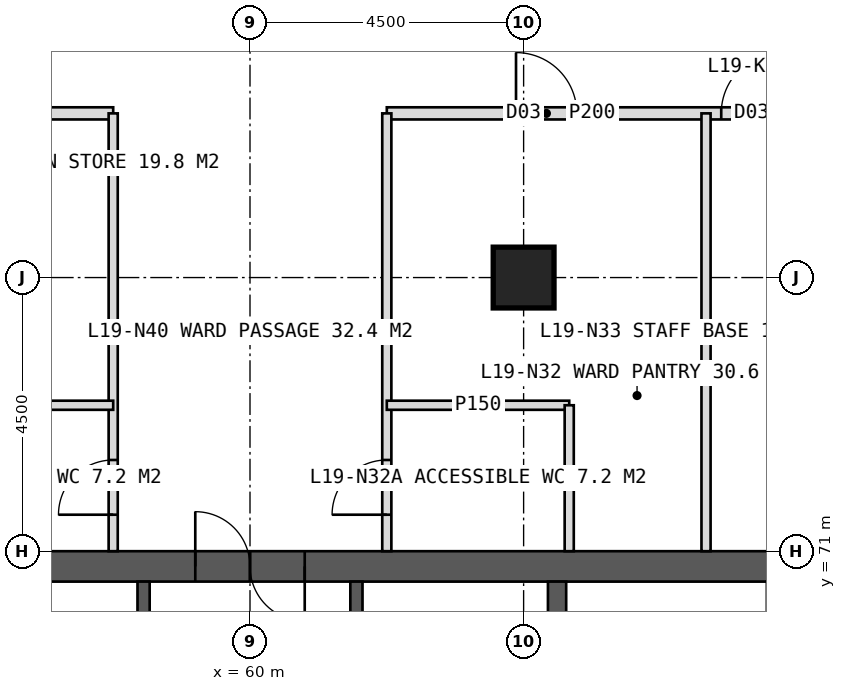
"""IFC4 building model, lengths in metres.
Left out: names, types, materials, properties, quantities, classifications, styles, units other than length and angle.
Written with IfcOpenShell. Run it as: python <this file> out.ifc"""

import sys

from ifc_helpers import new_model, si_unit, direction, frame, frame_2d, origin, origin_2d, place, context, subcontext, project, spatial, rectangle, hollow_rectangle, extrude, element, fill, save


model = new_model("IFC4")
c1 = context("Model", 3, precision=1e-05, world=origin(), true_north=direction((0.0, 1.0)))
c2 = subcontext(c1, "Body", "Model", "MODEL_VIEW")
j1 = project(units=[si_unit("LENGTHUNIT", "METRE"), si_unit("PLANEANGLEUNIT", "RADIAN")], contexts=[c1])
p1 = place(None, origin())
s1 = spatial("IfcSite", under=j1, at=p1, CompositionType="ELEMENT")
p2 = place(p1, origin())
s2 = spatial("IfcBuilding", under=s1, at=p2, CompositionType="ELEMENT")
p3 = place(p2, frame((0.0, 0.0, 83.0)))
s3 = spatial("IfcBuildingStorey", under=s2, at=p3, CompositionType="ELEMENT", Elevation=83.0)
p4 = place(p3, frame((51.0, 70.75, 0.0), z_axis=(0.0, 0.0, 1.0), x_axis=(1.0, 0.0, 0.0)))
e1 = element("IfcWall", 1, at=p4, inside=s3, PredefinedType="SHEAR", context=c2, shape_type="SweptSolid", body=[
    extrude(rectangle(XDim=18.0, YDim=0.5, at=frame_2d((9.0, 0.0))), origin(), (0.0, 0.0, 1.0), 4.0),
])
p5 = place(p4, frame((8.1, 0.0, 0.0)))
e2 = element("IfcOpeningElement", 2, at=p5, cuts=e1, PredefinedType="OPENING", context=c2, shape_type="SweptSolid", body=[
    extrude(rectangle(XDim=1.8, YDim=2.2, at=frame_2d((0.9, 1.1))), frame((0.0, 0.26, 0.0), z_axis=(0.0, -1.0, 0.0), x_axis=(1.0, 0.0, 0.0)), (0.0, 0.0, 1.0), 0.52),
])
p6 = place(p3, frame((65.05, 53.5, 0.0), z_axis=(0.0, 0.0, 1.0), x_axis=(0.0, 1.0, 0.0)))
e3 = element("IfcWall", 3, at=p6, inside=s3, PredefinedType="SHEAR", context=c2, shape_type="SweptSolid", body=[
    extrude(rectangle(XDim=17.0, YDim=0.3, at=frame_2d((8.5, 0.0))), origin(), (0.0, 0.0, 1.0), 4.0),
])
p7 = place(p3, frame((58.25, 53.5, 0.0), z_axis=(0.0, 0.0, 1.0), x_axis=(0.0, 1.0, 0.0)))
e4 = element("IfcWall", 4, at=p7, inside=s3, PredefinedType="SHEAR", context=c2, shape_type="SweptSolid", body=[
    extrude(rectangle(XDim=17.0, YDim=0.2, at=frame_2d((8.5, 0.0))), origin(), (0.0, 0.0, 1.0), 4.0),
])
p8 = place(p7, frame((1.375, 0.0, 0.0)))
e5 = element("IfcOpeningElement", 5, at=p8, cuts=e4, PredefinedType="OPENING", context=c2, shape_type="SweptSolid", body=[
    extrude(rectangle(XDim=1.4, YDim=2.2, at=frame_2d((0.7, 1.1))), frame((0.0, 0.11, 0.0), z_axis=(0.0, -1.0, 0.0), x_axis=(1.0, 0.0, 0.0)), (0.0, 0.0, 1.0), 0.22),
])
p9 = place(p7, frame((5.675, 0.0, 0.0)))
e6 = element("IfcOpeningElement", 6, at=p9, cuts=e4, PredefinedType="OPENING", context=c2, shape_type="SweptSolid", body=[
    extrude(rectangle(XDim=1.4, YDim=2.2, at=frame_2d((0.7, 1.1))), frame((0.0, 0.11, 0.0), z_axis=(0.0, -1.0, 0.0), x_axis=(1.0, 0.0, 0.0)), (0.0, 0.0, 1.0), 0.22),
])
p10 = place(p3, frame((61.75, 53.5, 0.0), z_axis=(0.0, 0.0, 1.0), x_axis=(0.0, 1.0, 0.0)))
e7 = element("IfcWall", 7, at=p10, inside=s3, PredefinedType="SHEAR", context=c2, shape_type="SweptSolid", body=[
    extrude(rectangle(XDim=17.0, YDim=0.2, at=frame_2d((8.5, 0.0))), origin(), (0.0, 0.0, 1.0), 4.0),
])
p11 = place(p10, frame((1.375, 0.0, 0.0)))
e8 = element("IfcOpeningElement", 8, at=p11, cuts=e7, PredefinedType="OPENING", context=c2, shape_type="SweptSolid", body=[
    extrude(rectangle(XDim=1.4, YDim=2.2, at=frame_2d((0.7, 1.1))), frame((0.0, 0.11, 0.0), z_axis=(0.0, -1.0, 0.0), x_axis=(1.0, 0.0, 0.0)), (0.0, 0.0, 1.0), 0.22),
])
p12 = place(p10, frame((5.675, 0.0, 0.0)))
e9 = element("IfcOpeningElement", 9, at=p12, cuts=e7, PredefinedType="OPENING", context=c2, shape_type="SweptSolid", body=[
    extrude(rectangle(XDim=1.4, YDim=2.2, at=frame_2d((0.7, 1.1))), frame((0.0, 0.11, 0.0), z_axis=(0.0, -1.0, 0.0), x_axis=(1.0, 0.0, 0.0)), (0.0, 0.0, 1.0), 0.22),
])
p13 = place(p3, frame((64.5, 75.5, 0.0), z_axis=(0.0, 0.0, 1.0), x_axis=(1.0, 0.0, 0.0)))
e10 = element("IfcColumn", 10, at=p13, inside=s3, PredefinedType="COLUMN", context=c2, shape_type="SweptSolid", body=[
    extrude(hollow_rectangle(XDim=1.0, YDim=1.0, WallThickness=0.1, at=origin_2d()), origin(), (0.0, 0.0, 1.0), 4.0),
])
p14 = place(p3, frame((43.8, 78.2, 0.0), z_axis=(0.0, 0.0, 1.0), x_axis=(1.0, 0.0, 0.0)))
e11 = element("IfcWall", 11, at=p14, inside=s3, PredefinedType="PARTITIONING", context=c2, shape_type="SweptSolid", body=[
    extrude(rectangle(XDim=13.95, YDim=0.2, at=frame_2d((6.975, 0.0))), origin(), (0.0, 0.0, 1.0), 3.75),
])
p15 = place(p14, frame((8.2, 0.0, 0.0)))
e12 = element("IfcOpeningElement", 12, at=p15, cuts=e11, PredefinedType="OPENING", context=c2, shape_type="SweptSolid", body=[
    extrude(rectangle(XDim=1.0, YDim=2.1, at=frame_2d((0.5, 1.05))), frame((0.0, 0.11, 0.0), z_axis=(0.0, -1.0, 0.0), x_axis=(1.0, 0.0, 0.0)), (0.0, 0.0, 1.0), 0.22),
])
p16 = place(p14, frame((11.575, 0.0, 0.0)))
e13 = element("IfcOpeningElement", 13, at=p16, cuts=e11, PredefinedType="OPENING", context=c2, shape_type="SweptSolid", body=[
    extrude(rectangle(XDim=1.0, YDim=2.1, at=frame_2d((0.5, 1.05))), frame((0.0, 0.11, 0.0), z_axis=(0.0, -1.0, 0.0), x_axis=(1.0, 0.0, 0.0)), (0.0, 0.0, 1.0), 0.22),
])
p17 = place(p3, frame((62.25, 78.2, 0.0), z_axis=(0.0, 0.0, 1.0), x_axis=(1.0, 0.0, 0.0)))
e14 = element("IfcWall", 14, at=p17, inside=s3, PredefinedType="PARTITIONING", context=c2, shape_type="SweptSolid", body=[
    extrude(rectangle(XDim=6.75, YDim=0.2, at=frame_2d((3.375, 0.0))), origin(), (0.0, 0.0, 1.0), 3.75),
])
p18 = place(p17, frame((2.125, 0.0, 0.0)))
e15 = element("IfcOpeningElement", 15, at=p18, cuts=e14, PredefinedType="OPENING", context=c2, shape_type="SweptSolid", body=[
    extrude(rectangle(XDim=1.0, YDim=2.1, at=frame_2d((0.5, 1.05))), frame((0.0, 0.11, 0.0), z_axis=(0.0, -1.0, 0.0), x_axis=(1.0, 0.0, 0.0)), (0.0, 0.0, 1.0), 0.22),
])
p19 = place(p17, frame((5.5, 0.0, 0.0)))
e16 = element("IfcOpeningElement", 16, at=p19, cuts=e14, PredefinedType="OPENING", context=c2, shape_type="SweptSolid", body=[
    extrude(rectangle(XDim=1.0, YDim=2.1, at=frame_2d((0.5, 1.05))), frame((0.0, 0.11, 0.0), z_axis=(0.0, -1.0, 0.0), x_axis=(1.0, 0.0, 0.0)), (0.0, 0.0, 1.0), 0.22),
])
p20 = place(p3, frame((57.75, 71.0, 0.0), z_axis=(0.0, 0.0, 1.0), x_axis=(0.0, 1.0, 0.0)))
e17 = element("IfcWall", 17, at=p20, inside=s3, PredefinedType="PARTITIONING", context=c2, shape_type="SweptSolid", body=[
    extrude(rectangle(XDim=7.2, YDim=0.15, at=frame_2d((3.6, 0.0))), origin(), (0.0, 0.0, 1.0), 3.75),
])
p21 = place(p20, frame((0.6, 0.0, 0.0)))
e18 = element("IfcOpeningElement", 18, at=p21, cuts=e17, PredefinedType="OPENING", context=c2, shape_type="SweptSolid", body=[
    extrude(rectangle(XDim=0.9, YDim=2.1, at=frame_2d((0.45, 1.05))), frame((0.0, 0.085, 0.0), z_axis=(0.0, -1.0, 0.0), x_axis=(1.0, 0.0, 0.0)), (0.0, 0.0, 1.0), 0.17),
])
p22 = place(p3, frame((62.25, 71.0, 0.0), z_axis=(0.0, 0.0, 1.0), x_axis=(0.0, 1.0, 0.0)))
e19 = element("IfcWall", 19, at=p22, inside=s3, PredefinedType="PARTITIONING", context=c2, shape_type="SweptSolid", body=[
    extrude(rectangle(XDim=7.2, YDim=0.15, at=frame_2d((3.6, 0.0))), origin(), (0.0, 0.0, 1.0), 3.75),
])
p23 = place(p22, frame((0.6, 0.0, 0.0)))
e20 = element("IfcOpeningElement", 20, at=p23, cuts=e19, PredefinedType="OPENING", context=c2, shape_type="SweptSolid", body=[
    extrude(rectangle(XDim=0.9, YDim=2.1, at=frame_2d((0.45, 1.05))), frame((0.0, 0.085, 0.0), z_axis=(0.0, -1.0, 0.0), x_axis=(1.0, 0.0, 0.0)), (0.0, 0.0, 1.0), 0.17),
])
p24 = place(p3, frame((67.5, 71.0, 0.0), z_axis=(0.0, 0.0, 1.0), x_axis=(0.0, 1.0, 0.0)))
e21 = element("IfcWall", 21, at=p24, inside=s3, PredefinedType="PARTITIONING", context=c2, shape_type="SweptSolid", body=[
    extrude(rectangle(XDim=7.2, YDim=0.15, at=frame_2d((3.6, 0.0))), origin(), (0.0, 0.0, 1.0), 3.75),
])
for number, where, z_axis, x_axis in (
    (22, (54.75, 73.4, 0.0), (0.0, 0.0, 1.0), (1.0, 0.0, 0.0)),
    (23, (62.25, 73.4, 0.0), (0.0, 0.0, 1.0), (1.0, 0.0, 0.0)),
):
    element("IfcWall", number, at=place(p3, frame(where, z_axis=z_axis, x_axis=x_axis)), inside=s3, PredefinedType="PARTITIONING", context=c2, shape_type="SweptSolid", body=[
        extrude(rectangle(XDim=3.0, YDim=0.15, at=frame_2d((1.5, 0.0))), origin(), (0.0, 0.0, 1.0), 3.75),
    ])
p25 = place(p3, frame((65.25, 71.0, 0.0), z_axis=(0.0, 0.0, 1.0), x_axis=(0.0, 1.0, 0.0)))
e24 = element("IfcWall", 24, at=p25, inside=s3, PredefinedType="PARTITIONING", context=c2, shape_type="SweptSolid", body=[
    extrude(rectangle(XDim=2.4, YDim=0.15, at=frame_2d((1.2, 0.0))), origin(), (0.0, 0.0, 1.0), 3.75),
])
p26 = place(p21, origin())
e25 = element("IfcDoor", 25, at=p26, inside=s3, OperationType="SINGLE_SWING_LEFT", PredefinedType="DOOR", context=c2, shape_type="SweptSolid", body=[
    extrude(rectangle(XDim=0.9, YDim=2.1, at=frame_2d((0.45, 1.05))), frame((0.0, 0.025, 0.0), z_axis=(0.0, -1.0, 0.0), x_axis=(1.0, 0.0, 0.0)), (0.0, 0.0, 1.0), 0.05),
])
fill(e18, e25)
p27 = place(p23, origin())
e26 = element("IfcDoor", 26, at=p27, inside=s3, OperationType="SINGLE_SWING_LEFT", PredefinedType="DOOR", context=c2, shape_type="SweptSolid", body=[
    extrude(rectangle(XDim=0.9, YDim=2.1, at=frame_2d((0.45, 1.05))), frame((0.0, 0.025, 0.0), z_axis=(0.0, -1.0, 0.0), x_axis=(1.0, 0.0, 0.0)), (0.0, 0.0, 1.0), 0.05),
])
fill(e20, e26)
p28 = place(p18, origin())
e27 = element("IfcDoor", 27, at=p28, inside=s3, OperationType="SINGLE_SWING_LEFT", PredefinedType="DOOR", context=c2, shape_type="SweptSolid", body=[
    extrude(rectangle(XDim=1.0, YDim=2.1, at=frame_2d((0.5, 1.05))), frame((0.0, 0.025, 0.0), z_axis=(0.0, -1.0, 0.0), x_axis=(1.0, 0.0, 0.0)), (0.0, 0.0, 1.0), 0.05),
])
fill(e15, e27)
p29 = place(p19, origin())
e28 = element("IfcDoor", 28, at=p29, inside=s3, OperationType="SINGLE_SWING_RIGHT", PredefinedType="DOOR", context=c2, shape_type="SweptSolid", body=[
    extrude(rectangle(XDim=1.0, YDim=2.1, at=frame_2d((0.5, 1.05))), frame((0.0, 0.025, 0.0), z_axis=(0.0, -1.0, 0.0), x_axis=(1.0, 0.0, 0.0)), (0.0, 0.0, 1.0), 0.05),
])
fill(e16, e28)
p30 = place(p5, origin())
e29 = element("IfcDoor", 29, at=p30, inside=s3, OperationType="DOUBLE_DOOR_SINGLE_SWING", PredefinedType="DOOR", context=c2, shape_type="SweptSolid", body=[
    extrude(rectangle(XDim=1.8, YDim=2.2, at=frame_2d((0.9, 1.1))), frame((0.0, 0.025, 0.0), z_axis=(0.0, -1.0, 0.0), x_axis=(1.0, 0.0, 0.0)), (0.0, 0.0, 1.0), 0.05),
])
fill(e2, e29)
save(model, sys.argv[1])
